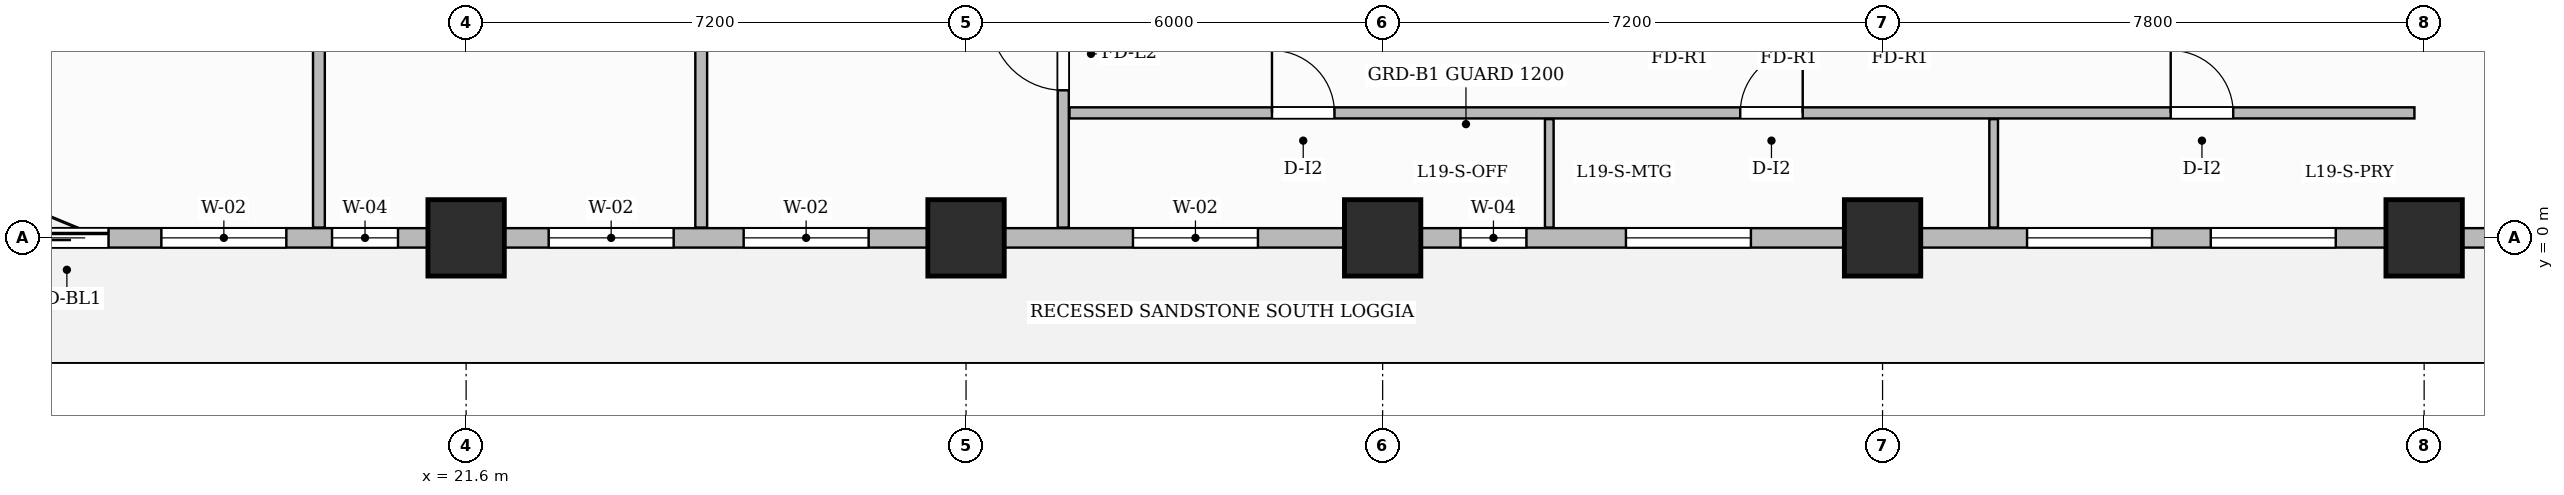
"""IFC4 building model, lengths in metres.
Left out: names, types, materials, properties, quantities, classifications, styles, units other than length and angle.
Written with IfcOpenShell. Run it as: python <this file> out.ifc"""

import sys

from ifc_helpers import new_model, si_unit, direction, frame, frame_2d, origin, origin_2d, place, context, subcontext, project, spatial, rectangle, extrude, source, transform, mapped, element, fill, save


model = new_model("IFC4")
c1 = context("Model", 3, precision=1e-05, world=origin(), true_north=direction((0.0, 1.0)))
c2 = subcontext(c1, "Body", "Model", "MODEL_VIEW")
j1 = project(units=[si_unit("LENGTHUNIT", "METRE"), si_unit("PLANEANGLEUNIT", "RADIAN")], contexts=[c1])
p1 = place(None, origin())
s1 = spatial("IfcSite", under=j1, at=p1, CompositionType="ELEMENT")
p2 = place(p1, origin())
s2 = spatial("IfcBuilding", under=s1, at=p2, CompositionType="ELEMENT")
p3 = place(p2, frame((0.0, 0.0, 80.5)))
s3 = spatial("IfcBuildingStorey", under=s2, at=p3, CompositionType="ELEMENT", Elevation=80.5)
m1 = source(origin(), c2, "Body", "SweptSolid", [
    extrude(rectangle(XDim=1.1, YDim=1.1, at=origin_2d()), origin(), (0.0, 0.0, 1.0), 3.7),
])
for number, where, z_axis, x_axis in (
    (1, (21.6, 0.0, 0.0), (0.0, 0.0, 1.0), (1.0, 0.0, 0.0)),
    (2, (28.8, 0.0, 0.0), (0.0, 0.0, 1.0), (1.0, 0.0, 0.0)),
    (3, (34.8, 0.0, 0.0), (0.0, 0.0, 1.0), (1.0, 0.0, 0.0)),
    (4, (42.0, 0.0, 0.0), (0.0, 0.0, 1.0), (1.0, 0.0, 0.0)),
    (5, (49.8, 0.0, 0.0), (0.0, 0.0, 1.0), (1.0, 0.0, 0.0)),
):
    element("IfcColumn", number, at=place(p3, frame(where, z_axis=z_axis, x_axis=x_axis)), inside=s3, PredefinedType="COLUMN", context=c2, shape_type="MappedRepresentation", body=[
        mapped(m1, transform((0.0, 0.0, 0.0), scale=1.0)),
    ])
p4 = place(p3, frame((30.2, 0.148, 0.0), z_axis=(0.0, 0.0, 1.0), x_axis=(0.0, 1.0, 0.0)))
e6 = element("IfcWall", 6, at=p4, inside=s3, PredefinedType="PARTITIONING", context=c2, shape_type="SweptSolid", body=[
    extrude(rectangle(XDim=9.112, YDim=0.16, at=frame_2d((4.556, 0.0))), origin(), (0.0, 0.0, 1.0), 3.45),
])
p5 = place(p4, frame((1.977, 0.0, 0.0)))
e7 = element("IfcOpeningElement", 7, at=p5, cuts=e6, PredefinedType="OPENING", context=c2, shape_type="SweptSolid", body=[
    extrude(rectangle(XDim=1.05, YDim=2.15, at=frame_2d((0.525, 1.075))), frame((0.0, 0.09, 0.0), z_axis=(0.0, -1.0, 0.0), x_axis=(1.0, 0.0, 0.0)), (0.0, 0.0, 1.0), 0.18),
])
p6 = place(p3, frame((30.29, 1.8, 0.0), z_axis=(0.0, 0.0, 1.0), x_axis=(1.0, 0.0, 0.0)))
e8 = element("IfcWall", 8, at=p6, inside=s3, PredefinedType="PARTITIONING", context=c2, shape_type="SweptSolid", body=[
    extrude(rectangle(XDim=19.37, YDim=0.16, at=frame_2d((9.685, 0.0))), origin(), (0.0, 0.0, 1.0), 3.45),
])
p7 = place(p6, frame((2.916, 0.0, 0.0)))
e9 = element("IfcOpeningElement", 9, at=p7, cuts=e8, PredefinedType="OPENING", context=c2, shape_type="SweptSolid", body=[
    extrude(rectangle(XDim=0.9, YDim=2.15, at=frame_2d((0.45, 1.075))), frame((0.0, 0.09, 0.0), z_axis=(0.0, -1.0, 0.0), x_axis=(1.0, 0.0, 0.0)), (0.0, 0.0, 1.0), 0.18),
])
p8 = place(p6, frame((9.66, 0.0, 0.0)))
e10 = element("IfcOpeningElement", 10, at=p8, cuts=e8, PredefinedType="OPENING", context=c2, shape_type="SweptSolid", body=[
    extrude(rectangle(XDim=0.9, YDim=2.15, at=frame_2d((0.45, 1.075))), frame((0.0, 0.09, 0.0), z_axis=(0.0, -1.0, 0.0), x_axis=(1.0, 0.0, 0.0)), (0.0, 0.0, 1.0), 0.18),
])
p9 = place(p6, frame((15.86, 0.0, 0.0)))
e11 = element("IfcOpeningElement", 11, at=p9, cuts=e8, PredefinedType="OPENING", context=c2, shape_type="SweptSolid", body=[
    extrude(rectangle(XDim=0.9, YDim=2.15, at=frame_2d((0.45, 1.075))), frame((0.0, 0.09, 0.0), z_axis=(0.0, -1.0, 0.0), x_axis=(1.0, 0.0, 0.0)), (0.0, 0.0, 1.0), 0.18),
])
for number, where, z_axis, x_axis in (
    (12, (37.2, 0.148, 0.0), (0.0, 0.0, 1.0), (0.0, 1.0, 0.0)),
    (13, (43.6, 0.148, 0.0), (0.0, 0.0, 1.0), (0.0, 1.0, 0.0)),
):
    element("IfcWall", number, at=place(p3, frame(where, z_axis=z_axis, x_axis=x_axis)), inside=s3, PredefinedType="PARTITIONING", context=c2, shape_type="SweptSolid", body=[
        extrude(rectangle(XDim=1.562, YDim=0.125, at=frame_2d((0.781, 0.0))), origin(), (0.0, 0.0, 1.0), 3.45),
    ])
p10 = place(p3, frame((19.48, 0.148, 0.0), z_axis=(0.0, 0.0, 1.0), x_axis=(0.0, 1.0, 0.0)))
e14 = element("IfcWall", 14, at=p10, inside=s3, PredefinedType="PARTITIONING", context=c2, shape_type="SweptSolid", body=[
    extrude(rectangle(XDim=9.112, YDim=0.17, at=frame_2d((4.556, 0.0))), origin(), (0.0, 0.0, 1.0), 3.45),
])
p11 = place(p3, frame((24.986, 0.148, 0.0), z_axis=(0.0, 0.0, 1.0), x_axis=(0.0, 1.0, 0.0)))
e15 = element("IfcWall", 15, at=p11, inside=s3, PredefinedType="PARTITIONING", context=c2, shape_type="SweptSolid", body=[
    extrude(rectangle(XDim=9.112, YDim=0.17, at=frame_2d((4.556, 0.0))), origin(), (0.0, 0.0, 1.0), 3.075),
])
p12 = place(p3, frame((14.4, 0.0, 0.0), z_axis=(0.0, 0.0, 1.0), x_axis=(1.0, 0.0, 0.0)))
e16 = element("IfcWall", 16, at=p12, inside=s3, PredefinedType="SOLIDWALL", context=c2, shape_type="SweptSolid", body=[
    extrude(rectangle(XDim=43.2, YDim=0.28, at=frame_2d((21.6, 0.0))), origin(), (0.0, 0.0, 1.0), 2.885),
])
p13 = place(p12, frame((0.85, 0.0, 0.0)))
e17 = element("IfcOpeningElement", 17, at=p13, cuts=e16, PredefinedType="OPENING", context=c2, shape_type="SweptSolid", body=[
    extrude(rectangle(XDim=1.2, YDim=2.2, at=frame_2d((0.6, 1.1))), frame((0.0, 0.15, 0.0), z_axis=(0.0, -1.0, 0.0), x_axis=(1.0, 0.0, 0.0)), (0.0, 0.0, 1.0), 0.3),
])
p14 = place(p12, frame((2.811, 0.0, 0.8)))
e18 = element("IfcOpeningElement", 18, at=p14, cuts=e16, PredefinedType="OPENING", context=c2, shape_type="SweptSolid", body=[
    extrude(rectangle(XDim=1.8, YDim=1.85, at=frame_2d((0.9, 0.925))), frame((0.0, 0.15, 0.0), z_axis=(0.0, -1.0, 0.0), x_axis=(1.0, 0.0, 0.0)), (0.0, 0.0, 1.0), 0.3),
])
p15 = place(p12, frame((5.269, 0.0, 0.8)))
e19 = element("IfcOpeningElement", 19, at=p15, cuts=e16, PredefinedType="OPENING", context=c2, shape_type="SweptSolid", body=[
    extrude(rectangle(XDim=0.95, YDim=1.75, at=frame_2d((0.475, 0.875))), frame((0.0, 0.15, 0.0), z_axis=(0.0, -1.0, 0.0), x_axis=(1.0, 0.0, 0.0)), (0.0, 0.0, 1.0), 0.3),
])
p16 = place(p12, frame((8.389, 0.0, 0.8)))
e20 = element("IfcOpeningElement", 20, at=p16, cuts=e16, PredefinedType="OPENING", context=c2, shape_type="SweptSolid", body=[
    extrude(rectangle(XDim=1.8, YDim=1.85, at=frame_2d((0.9, 0.925))), frame((0.0, 0.15, 0.0), z_axis=(0.0, -1.0, 0.0), x_axis=(1.0, 0.0, 0.0)), (0.0, 0.0, 1.0), 0.3),
])
p17 = place(p12, frame((11.197, 0.0, 0.8)))
e21 = element("IfcOpeningElement", 21, at=p17, cuts=e16, PredefinedType="OPENING", context=c2, shape_type="SweptSolid", body=[
    extrude(rectangle(XDim=1.8, YDim=1.85, at=frame_2d((0.9, 0.925))), frame((0.0, 0.15, 0.0), z_axis=(0.0, -1.0, 0.0), x_axis=(1.0, 0.0, 0.0)), (0.0, 0.0, 1.0), 0.3),
])
p18 = place(p12, frame((16.804, 0.0, 0.8)))
e22 = element("IfcOpeningElement", 22, at=p18, cuts=e16, PredefinedType="OPENING", context=c2, shape_type="SweptSolid", body=[
    extrude(rectangle(XDim=1.8, YDim=1.85, at=frame_2d((0.9, 0.925))), frame((0.0, 0.15, 0.0), z_axis=(0.0, -1.0, 0.0), x_axis=(1.0, 0.0, 0.0)), (0.0, 0.0, 1.0), 0.3),
])
p19 = place(p12, frame((21.521, 0.0, 0.8)))
e23 = element("IfcOpeningElement", 23, at=p19, cuts=e16, PredefinedType="OPENING", context=c2, shape_type="SweptSolid", body=[
    extrude(rectangle(XDim=0.95, YDim=1.75, at=frame_2d((0.475, 0.875))), frame((0.0, 0.15, 0.0), z_axis=(0.0, -1.0, 0.0), x_axis=(1.0, 0.0, 0.0)), (0.0, 0.0, 1.0), 0.3),
])
p20 = place(p12, frame((23.904, 0.0, 0.8)))
e24 = element("IfcOpeningElement", 24, at=p20, cuts=e16, PredefinedType="OPENING", context=c2, shape_type="SweptSolid", body=[
    extrude(rectangle(XDim=1.8, YDim=1.85, at=frame_2d((0.9, 0.925))), frame((0.0, 0.15, 0.0), z_axis=(0.0, -1.0, 0.0), x_axis=(1.0, 0.0, 0.0)), (0.0, 0.0, 1.0), 0.3),
])
p21 = place(p12, frame((29.681, 0.0, 0.8)))
e25 = element("IfcOpeningElement", 25, at=p21, cuts=e16, PredefinedType="OPENING", context=c2, shape_type="SweptSolid", body=[
    extrude(rectangle(XDim=1.8, YDim=1.85, at=frame_2d((0.9, 0.925))), frame((0.0, 0.15, 0.0), z_axis=(0.0, -1.0, 0.0), x_axis=(1.0, 0.0, 0.0)), (0.0, 0.0, 1.0), 0.3),
])
p22 = place(p12, frame((32.327, 0.0, 0.8)))
e26 = element("IfcOpeningElement", 26, at=p22, cuts=e16, PredefinedType="OPENING", context=c2, shape_type="SweptSolid", body=[
    extrude(rectangle(XDim=1.8, YDim=1.85, at=frame_2d((0.9, 0.925))), frame((0.0, 0.15, 0.0), z_axis=(0.0, -1.0, 0.0), x_axis=(1.0, 0.0, 0.0)), (0.0, 0.0, 1.0), 0.3),
])
p23 = place(p12, frame((36.875, 0.0, 0.8)))
e27 = element("IfcOpeningElement", 27, at=p23, cuts=e16, PredefinedType="OPENING", context=c2, shape_type="SweptSolid", body=[
    extrude(rectangle(XDim=1.8, YDim=1.85, at=frame_2d((0.9, 0.925))), frame((0.0, 0.15, 0.0), z_axis=(0.0, -1.0, 0.0), x_axis=(1.0, 0.0, 0.0)), (0.0, 0.0, 1.0), 0.3),
])
p24 = place(p12, frame((39.925, 0.0, 0.8)))
e28 = element("IfcOpeningElement", 28, at=p24, cuts=e16, PredefinedType="OPENING", context=c2, shape_type="SweptSolid", body=[
    extrude(rectangle(XDim=1.8, YDim=1.85, at=frame_2d((0.9, 0.925))), frame((0.0, 0.15, 0.0), z_axis=(0.0, -1.0, 0.0), x_axis=(1.0, 0.0, 0.0)), (0.0, 0.0, 1.0), 0.3),
])
m2 = source(origin(), c2, "Body", "SweptSolid", [
    extrude(rectangle(XDim=1.05, YDim=2.15, at=frame_2d((0.525, 1.075))), frame((0.0, 0.025, 0.0), z_axis=(0.0, -1.0, 0.0), x_axis=(1.0, 0.0, 0.0)), (0.0, 0.0, 1.0), 0.05),
])
p25 = place(p5, origin())
e29 = element("IfcDoor", 29, at=p25, inside=s3, OperationType="SINGLE_SWING_RIGHT", PredefinedType="DOOR", context=c2, shape_type="MappedRepresentation", body=[
    mapped(m2, transform((0.0, 0.0, 0.0), scale=1.0)),
])
fill(e7, e29)
m3 = source(origin(), c2, "Body", "SweptSolid", [
    extrude(rectangle(XDim=0.9, YDim=2.15, at=frame_2d((0.45, 1.075))), frame((0.0, 0.025, 0.0), z_axis=(0.0, -1.0, 0.0), x_axis=(1.0, 0.0, 0.0)), (0.0, 0.0, 1.0), 0.05),
])
p26 = place(p7, origin())
e30 = element("IfcDoor", 30, at=p26, inside=s3, OperationType="SINGLE_SWING_LEFT", PredefinedType="DOOR", context=c2, shape_type="MappedRepresentation", body=[
    mapped(m3, transform((0.0, 0.0, 0.0), scale=1.0)),
])
fill(e9, e30)
p27 = place(p8, origin())
e31 = element("IfcDoor", 31, at=p27, inside=s3, OperationType="SINGLE_SWING_RIGHT", PredefinedType="DOOR", context=c2, shape_type="MappedRepresentation", body=[
    mapped(m3, transform((0.0, 0.0, 0.0), scale=1.0)),
])
fill(e10, e31)
p28 = place(p9, origin())
e32 = element("IfcDoor", 32, at=p28, inside=s3, OperationType="SINGLE_SWING_LEFT", PredefinedType="DOOR", context=c2, shape_type="MappedRepresentation", body=[
    mapped(m3, transform((0.0, 0.0, 0.0), scale=1.0)),
])
fill(e11, e32)
m4 = source(origin(), c2, "Body", "SweptSolid", [
    extrude(rectangle(XDim=1.2, YDim=2.2, at=frame_2d((0.6, 1.1))), frame((0.0, 0.025, 0.0), z_axis=(0.0, -1.0, 0.0), x_axis=(1.0, 0.0, 0.0)), (0.0, 0.0, 1.0), 0.05),
])
p29 = place(p13, origin())
e33 = element("IfcDoor", 33, at=p29, inside=s3, OperationType="SLIDING_TO_LEFT", PredefinedType="DOOR", context=c2, shape_type="MappedRepresentation", body=[
    mapped(m4, transform((0.0, 0.0, 0.0), scale=1.0)),
])
fill(e17, e33)
m5 = source(origin(), c2, "Body", "SweptSolid", [
    extrude(rectangle(XDim=1.8, YDim=1.85, at=frame_2d((0.9, 0.925))), frame((0.0, 0.03, 0.0), z_axis=(0.0, -1.0, 0.0), x_axis=(1.0, 0.0, 0.0)), (0.0, 0.0, 1.0), 0.06),
])
p30 = place(p14, origin())
e34 = element("IfcWindow", 34, at=p30, inside=s3, PartitioningType="DOUBLE_PANEL_VERTICAL", PredefinedType="WINDOW", context=c2, shape_type="MappedRepresentation", body=[
    mapped(m5, transform((0.0, 0.0, 0.0), scale=1.0)),
])
fill(e18, e34)
m6 = source(origin(), c2, "Body", "SweptSolid", [
    extrude(rectangle(XDim=0.95, YDim=1.75, at=frame_2d((0.475, 0.875))), frame((0.0, 0.03, 0.0), z_axis=(0.0, -1.0, 0.0), x_axis=(1.0, 0.0, 0.0)), (0.0, 0.0, 1.0), 0.06),
])
p31 = place(p15, origin())
e35 = element("IfcWindow", 35, at=p31, inside=s3, PartitioningType="SINGLE_PANEL", PredefinedType="WINDOW", context=c2, shape_type="MappedRepresentation", body=[
    mapped(m6, transform((0.0, 0.0, 0.0), scale=1.0)),
])
fill(e19, e35)
p32 = place(p16, origin())
e36 = element("IfcWindow", 36, at=p32, inside=s3, PartitioningType="DOUBLE_PANEL_VERTICAL", PredefinedType="WINDOW", context=c2, shape_type="MappedRepresentation", body=[
    mapped(m5, transform((0.0, 0.0, 0.0), scale=1.0)),
])
fill(e20, e36)
p33 = place(p17, origin())
e37 = element("IfcWindow", 37, at=p33, inside=s3, PartitioningType="DOUBLE_PANEL_VERTICAL", PredefinedType="WINDOW", context=c2, shape_type="MappedRepresentation", body=[
    mapped(m5, transform((0.0, 0.0, 0.0), scale=1.0)),
])
fill(e21, e37)
p34 = place(p18, origin())
e38 = element("IfcWindow", 38, at=p34, inside=s3, PartitioningType="DOUBLE_PANEL_VERTICAL", PredefinedType="WINDOW", context=c2, shape_type="MappedRepresentation", body=[
    mapped(m5, transform((0.0, 0.0, 0.0), scale=1.0)),
])
fill(e22, e38)
p35 = place(p19, origin())
e39 = element("IfcWindow", 39, at=p35, inside=s3, PartitioningType="SINGLE_PANEL", PredefinedType="WINDOW", context=c2, shape_type="MappedRepresentation", body=[
    mapped(m6, transform((0.0, 0.0, 0.0), scale=1.0)),
])
fill(e23, e39)
p36 = place(p20, origin())
e40 = element("IfcWindow", 40, at=p36, inside=s3, PartitioningType="DOUBLE_PANEL_VERTICAL", PredefinedType="WINDOW", context=c2, shape_type="MappedRepresentation", body=[
    mapped(m5, transform((0.0, 0.0, 0.0), scale=1.0)),
])
fill(e24, e40)
p37 = place(p21, origin())
e41 = element("IfcWindow", 41, at=p37, inside=s3, PartitioningType="DOUBLE_PANEL_VERTICAL", PredefinedType="WINDOW", context=c2, shape_type="MappedRepresentation", body=[
    mapped(m5, transform((0.0, 0.0, 0.0), scale=1.0)),
])
fill(e25, e41)
p38 = place(p22, origin())
e42 = element("IfcWindow", 42, at=p38, inside=s3, PartitioningType="DOUBLE_PANEL_VERTICAL", PredefinedType="WINDOW", context=c2, shape_type="MappedRepresentation", body=[
    mapped(m5, transform((0.0, 0.0, 0.0), scale=1.0)),
])
fill(e26, e42)
save(model, sys.argv[1])
